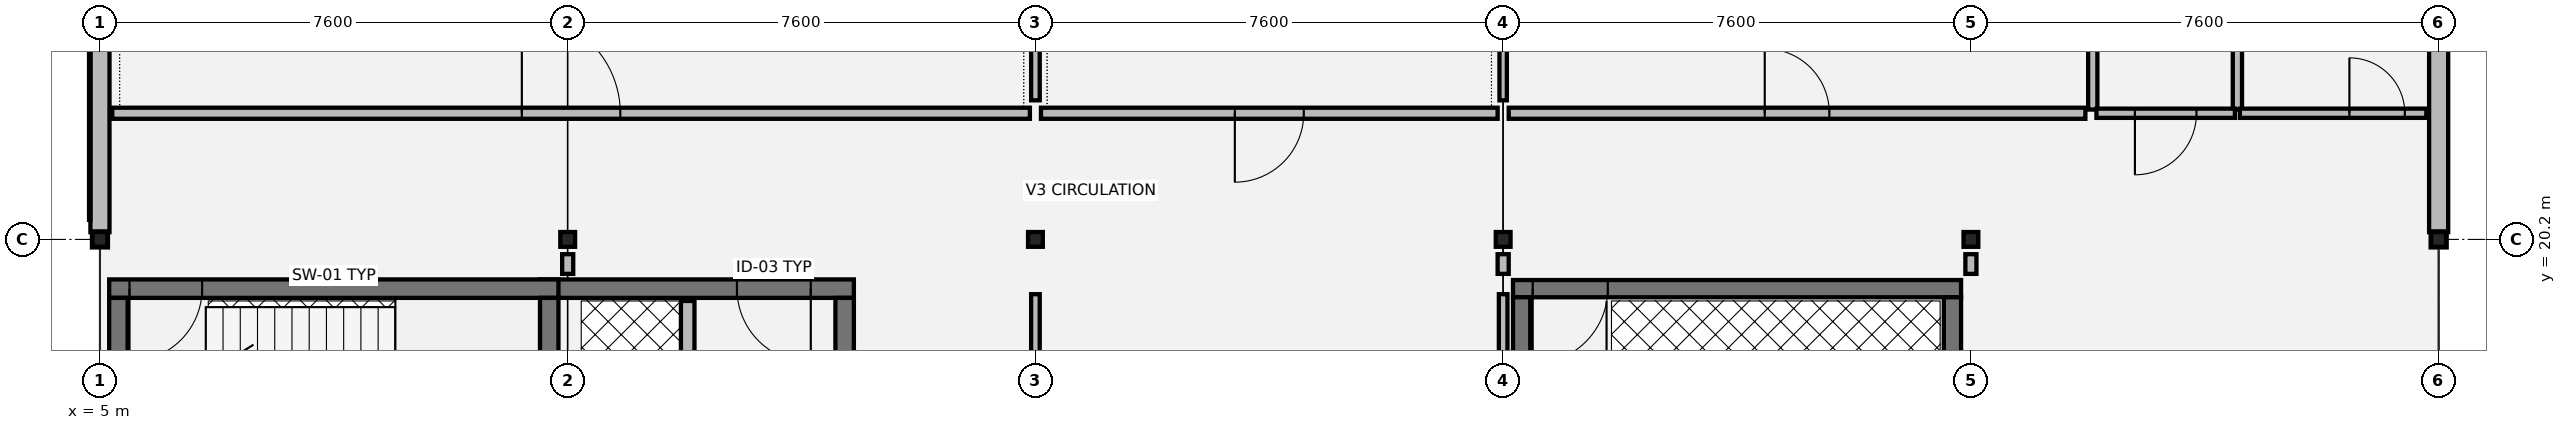
"""IFC4 building model, lengths in metres.
Left out: names, types, materials, properties, quantities, classifications, styles, units other than length and angle.
Written with IfcOpenShell. Run it as: python <this file> out.ifc"""

import sys

from ifc_helpers import new_model, si_unit, direction, frame, frame_2d, origin, origin_2d, place, context, subcontext, project, spatial, rectangle, i_section, extrude, element, fill, save


model = new_model("IFC4")
c1 = context("Model", 3, precision=1e-05, world=origin(), true_north=direction((0.0, 1.0)))
c2 = subcontext(c1, "Body", "Model", "MODEL_VIEW")
j1 = project(units=[si_unit("LENGTHUNIT", "METRE"), si_unit("PLANEANGLEUNIT", "RADIAN")], contexts=[c1])
p1 = place(None, origin())
s1 = spatial("IfcSite", under=j1, at=p1, CompositionType="ELEMENT")
p2 = place(p1, origin())
s2 = spatial("IfcBuilding", under=s1, at=p2, CompositionType="ELEMENT")
p3 = place(p2, frame((0.0, 0.0, 9.18)))
s3 = spatial("IfcBuildingStorey", under=s2, at=p3, CompositionType="ELEMENT", Elevation=9.18)
for number, where, z_axis, x_axis in (
    (1, (5.0, 20.2, 0.0), (0.0, 0.0, 1.0), (1.0, 0.0, 0.0)),
    (2, (12.6, 20.2, 0.0), (0.0, 0.0, 1.0), (1.0, 0.0, 0.0)),
    (3, (20.2, 20.2, 0.0), (0.0, 0.0, 1.0), (1.0, 0.0, 0.0)),
    (4, (27.8, 20.2, 0.0), (0.0, 0.0, 1.0), (1.0, 0.0, 0.0)),
    (5, (35.4, 20.2, 0.0), (0.0, 0.0, 1.0), (1.0, 0.0, 0.0)),
    (6, (43.0, 20.2, 0.0), (0.0, 0.0, 1.0), (1.0, 0.0, 0.0)),
):
    element("IfcColumn", number, at=place(p3, frame(where, z_axis=z_axis, x_axis=x_axis)), inside=s3, PredefinedType="COLUMN", context=c2, shape_type="SweptSolid", body=[
        extrude(i_section(OverallWidth=0.24, OverallDepth=0.24, WebThickness=0.01, FlangeThickness=0.017, at=origin_2d()), origin(), (0.0, 0.0, 1.0), 4.04),
    ])
for number, where, z_axis, x_axis in (
    (7, (43.0, 20.318, 0.0), (0.0, 0.0, 1.0), (0.0, 1.0, 0.0)),
    (8, (5.0, 27.682, 0.0), (0.0, 0.0, 1.0), (0.0, -1.0, 0.0)),
):
    element("IfcWall", number, at=place(p3, frame(where, z_axis=z_axis, x_axis=x_axis)), inside=s3, PredefinedType="SOLIDWALL", context=c2, shape_type="SweptSolid", body=[
        extrude(rectangle(XDim=7.364, YDim=0.31, at=frame_2d((3.682, 0.0))), origin(), (0.0, 0.0, 1.0), 3.48),
    ])
p4 = place(p3, frame((17.25, 19.4, 0.0), z_axis=(0.0, 0.0, 1.0), x_axis=(-1.0, 0.0, 0.0)))
e9 = element("IfcWall", 9, at=p4, inside=s3, PredefinedType="SHEAR", context=c2, shape_type="SweptSolid", body=[
    extrude(rectangle(XDim=5.1, YDim=0.3, at=frame_2d((2.55, 0.0))), origin(), (0.0, 0.0, 1.0), 3.902),
])
p5 = place(p4, frame((0.7, 0.0, 0.0)))
e10 = element("IfcOpeningElement", 10, at=p5, cuts=e9, PredefinedType="OPENING", context=c2, shape_type="SweptSolid", body=[
    extrude(rectangle(XDim=1.2, YDim=2.16, at=frame_2d((0.6, 1.08))), frame((0.0, 0.16, 0.0), z_axis=(0.0, -1.0, 0.0), x_axis=(1.0, 0.0, 0.0)), (0.0, 0.0, 1.0), 0.32),
])
p6 = place(p3, frame((17.1, 13.55, 0.0), z_axis=(0.0, 0.0, 1.0), x_axis=(0.0, 1.0, 0.0)))
e11 = element("IfcWall", 11, at=p6, inside=s3, PredefinedType="SHEAR", context=c2, shape_type="SweptSolid", body=[
    extrude(rectangle(XDim=5.7, YDim=0.3, at=frame_2d((2.85, 0.0))), origin(), (0.0, 0.0, 1.0), 3.902),
])
p7 = place(p3, frame((14.55, 13.6, 0.0), z_axis=(0.0, 0.0, 1.0), x_axis=(0.0, 1.0, 0.0)))
e12 = element("IfcWall", 12, at=p7, inside=s3, PredefinedType="SOLIDWALL", context=c2, shape_type="SweptSolid", body=[
    extrude(rectangle(XDim=5.6, YDim=0.22, at=frame_2d((2.8, 0.0))), origin(), (0.0, 0.0, 1.0), 3.902),
])
p8 = place(p7, frame((0.35, 0.0, 0.0)))
e13 = element("IfcOpeningElement", 13, at=p8, cuts=e12, PredefinedType="OPENING", context=c2, shape_type="SweptSolid", body=[
    extrude(rectangle(XDim=1.1, YDim=2.15, at=frame_2d((0.55, 1.075))), frame((0.0, 0.12, 0.0), z_axis=(0.0, -1.0, 0.0), x_axis=(1.0, 0.0, 0.0)), (0.0, 0.0, 1.0), 0.24),
])
p9 = place(p3, frame((5.15, 19.4, 0.0), z_axis=(0.0, 0.0, 1.0), x_axis=(1.0, 0.0, 0.0)))
e14 = element("IfcWall", 14, at=p9, inside=s3, PredefinedType="SHEAR", context=c2, shape_type="SweptSolid", body=[
    extrude(rectangle(XDim=7.3, YDim=0.3, at=frame_2d((3.65, 0.0))), origin(), (0.0, 0.0, 1.0), 3.902),
])
p10 = place(p9, frame((0.33, 0.0, 0.0)))
e15 = element("IfcOpeningElement", 15, at=p10, cuts=e14, PredefinedType="OPENING", context=c2, shape_type="SweptSolid", body=[
    extrude(rectangle(XDim=1.18, YDim=2.18, at=frame_2d((0.59, 1.09))), frame((0.0, 0.16, 0.0), z_axis=(0.0, -1.0, 0.0), x_axis=(1.0, 0.0, 0.0)), (0.0, 0.0, 1.0), 0.32),
])
for number, where, z_axis, x_axis in (
    (16, (5.3, 13.55, 0.0), (0.0, 0.0, 1.0), (0.0, 1.0, 0.0)),
    (17, (12.3, 13.55, 0.0), (0.0, 0.0, 1.0), (0.0, 1.0, 0.0)),
):
    element("IfcWall", number, at=place(p3, frame(where, z_axis=z_axis, x_axis=x_axis)), inside=s3, PredefinedType="SHEAR", context=c2, shape_type="SweptSolid", body=[
        extrude(rectangle(XDim=5.7, YDim=0.3, at=frame_2d((2.85, 0.0))), origin(), (0.0, 0.0, 1.0), 3.902),
    ])
p11 = place(p3, frame((27.96, 19.4, 0.0), z_axis=(0.0, 0.0, 1.0), x_axis=(1.0, 0.0, 0.0)))
e18 = element("IfcWall", 18, at=p11, inside=s3, PredefinedType="SHEAR", context=c2, shape_type="SweptSolid", body=[
    extrude(rectangle(XDim=7.28, YDim=0.28, at=frame_2d((3.64, 0.0))), origin(), (0.0, 0.0, 1.0), 3.902),
])
p12 = place(p11, frame((0.32, 0.0, 0.0)))
e19 = element("IfcOpeningElement", 19, at=p12, cuts=e18, PredefinedType="OPENING", context=c2, shape_type="SweptSolid", body=[
    extrude(rectangle(XDim=1.22, YDim=2.18, at=frame_2d((0.61, 1.09))), frame((0.0, 0.15, 0.0), z_axis=(0.0, -1.0, 0.0), x_axis=(1.0, 0.0, 0.0)), (0.0, 0.0, 1.0), 0.3),
])
for number, where, z_axis, x_axis in (
    (20, (28.1, 13.54, 0.0), (0.0, 0.0, 1.0), (0.0, 1.0, 0.0)),
    (21, (35.1, 13.54, 0.0), (0.0, 0.0, 1.0), (0.0, 1.0, 0.0)),
):
    element("IfcWall", number, at=place(p3, frame(where, z_axis=z_axis, x_axis=x_axis)), inside=s3, PredefinedType="SHEAR", context=c2, shape_type="SweptSolid", body=[
        extrude(rectangle(XDim=5.72, YDim=0.28, at=frame_2d((2.86, 0.0))), origin(), (0.0, 0.0, 1.0), 3.902),
    ])
for number, where, z_axis, x_axis in (
    (22, (37.38, 22.31, 0.0), (0.0, 0.0, 1.0), (0.0, 1.0, 0.0)),
    (23, (39.73, 22.31, 0.0), (0.0, 0.0, 1.0), (0.0, 1.0, 0.0)),
):
    element("IfcWall", number, at=place(p3, frame(where, z_axis=z_axis, x_axis=x_axis)), inside=s3, PredefinedType="PARTITIONING", context=c2, shape_type="SweptSolid", body=[
        extrude(rectangle(XDim=2.36, YDim=0.15, at=frame_2d((1.18, 0.0))), origin(), (0.0, 0.0, 1.0), 3.18),
    ])
p13 = place(p3, frame((37.44, 22.25, 0.0), z_axis=(0.0, 0.0, 1.0), x_axis=(1.0, 0.0, 0.0)))
e24 = element("IfcWall", 24, at=p13, inside=s3, PredefinedType="PARTITIONING", context=c2, shape_type="SweptSolid", body=[
    extrude(rectangle(XDim=2.25, YDim=0.15, at=frame_2d((1.125, 0.0))), origin(), (0.0, 0.0, 1.0), 3.18),
])
p14 = place(p13, frame((0.625, 0.0, 0.0)))
e25 = element("IfcOpeningElement", 25, at=p14, cuts=e24, PredefinedType="OPENING", context=c2, shape_type="SweptSolid", body=[
    extrude(rectangle(XDim=1.0, YDim=2.15, at=frame_2d((0.5, 1.075))), frame((0.0, 0.085, 0.0), z_axis=(0.0, -1.0, 0.0), x_axis=(1.0, 0.0, 0.0)), (0.0, 0.0, 1.0), 0.17),
])
p15 = place(p3, frame((39.77, 22.25, 0.0), z_axis=(0.0, 0.0, 1.0), x_axis=(1.0, 0.0, 0.0)))
e26 = element("IfcWall", 26, at=p15, inside=s3, PredefinedType="PARTITIONING", context=c2, shape_type="SweptSolid", body=[
    extrude(rectangle(XDim=3.03, YDim=0.15, at=frame_2d((1.515, 0.0))), origin(), (0.0, 0.0, 1.0), 3.18),
])
p16 = place(p15, frame((1.78, 0.0, 0.0)))
e27 = element("IfcOpeningElement", 27, at=p16, cuts=e26, PredefinedType="OPENING", context=c2, shape_type="SweptSolid", body=[
    extrude(rectangle(XDim=0.9, YDim=2.15, at=frame_2d((0.45, 1.075))), frame((0.0, 0.085, 0.0), z_axis=(0.0, -1.0, 0.0), x_axis=(1.0, 0.0, 0.0)), (0.0, 0.0, 1.0), 0.17),
])
p17 = place(p3, frame((5.2, 22.25, 0.0), z_axis=(0.0, 0.0, 1.0), x_axis=(1.0, 0.0, 0.0)))
e28 = element("IfcWall", 28, at=p17, inside=s3, PredefinedType="PARTITIONING", context=c2, shape_type="SweptSolid", body=[
    extrude(rectangle(XDim=14.91, YDim=0.18, at=frame_2d((7.455, 0.0))), origin(), (0.0, 0.0, 1.0), 3.18),
])
p18 = place(p17, frame((6.655, 0.0, 0.0)))
e29 = element("IfcOpeningElement", 29, at=p18, cuts=e28, PredefinedType="OPENING", context=c2, shape_type="SweptSolid", body=[
    extrude(rectangle(XDim=1.6, YDim=2.25, at=frame_2d((0.8, 1.125))), frame((0.0, 0.1, 0.0), z_axis=(0.0, -1.0, 0.0), x_axis=(1.0, 0.0, 0.0)), (0.0, 0.0, 1.0), 0.2),
])
p19 = place(p3, frame((20.29, 22.25, 0.0), z_axis=(0.0, 0.0, 1.0), x_axis=(1.0, 0.0, 0.0)))
e30 = element("IfcWall", 30, at=p19, inside=s3, PredefinedType="PARTITIONING", context=c2, shape_type="SweptSolid", body=[
    extrude(rectangle(XDim=7.42, YDim=0.18, at=frame_2d((3.71, 0.0))), origin(), (0.0, 0.0, 1.0), 3.18),
])
p20 = place(p19, frame((3.15, 0.0, 0.0)))
e31 = element("IfcOpeningElement", 31, at=p20, cuts=e30, PredefinedType="OPENING", context=c2, shape_type="SweptSolid", body=[
    extrude(rectangle(XDim=1.12, YDim=2.15, at=frame_2d((0.56, 1.075))), frame((0.0, 0.1, 0.0), z_axis=(0.0, -1.0, 0.0), x_axis=(1.0, 0.0, 0.0)), (0.0, 0.0, 1.0), 0.2),
])
p21 = place(p3, frame((27.89, 22.25, 0.0), z_axis=(0.0, 0.0, 1.0), x_axis=(1.0, 0.0, 0.0)))
e32 = element("IfcWall", 32, at=p21, inside=s3, PredefinedType="PARTITIONING", context=c2, shape_type="SweptSolid", body=[
    extrude(rectangle(XDim=9.37, YDim=0.18, at=frame_2d((4.685, 0.0))), origin(), (0.0, 0.0, 1.0), 3.18),
])
p22 = place(p21, frame((4.16, 0.0, 0.0)))
e33 = element("IfcOpeningElement", 33, at=p22, cuts=e32, PredefinedType="OPENING", context=c2, shape_type="SweptSolid", body=[
    extrude(rectangle(XDim=1.05, YDim=2.15, at=frame_2d((0.525, 1.075))), frame((0.0, 0.1, 0.0), z_axis=(0.0, -1.0, 0.0), x_axis=(1.0, 0.0, 0.0)), (0.0, 0.0, 1.0), 0.2),
])
for number, where, z_axis, x_axis in (
    (34, (12.6, 19.64, 0.0), (0.0, 0.0, 1.0), (0.0, 1.0, 0.0)),
    (35, (27.8, 19.64, 0.0), (0.0, 0.0, 1.0), (0.0, 1.0, 0.0)),
    (36, (35.4, 19.64, 0.0), (0.0, 0.0, 1.0), (0.0, 1.0, 0.0)),
):
    element("IfcWall", number, at=place(p3, frame(where, z_axis=z_axis, x_axis=x_axis)), inside=s3, PredefinedType="PARTITIONING", context=c2, shape_type="SweptSolid", body=[
        extrude(rectangle(XDim=0.32, YDim=0.18, at=frame_2d((0.16, 0.0))), origin(), (0.0, 0.0, 1.0), 3.18),
    ])
p23 = place(p3, frame((20.2, 22.46, 0.0), z_axis=(0.0, 0.0, 1.0), x_axis=(0.0, 1.0, 0.0)))
e37 = element("IfcWall", 37, at=p23, inside=s3, PredefinedType="PARTITIONING", context=c2, shape_type="SweptSolid", body=[
    extrude(rectangle(XDim=12.62, YDim=0.14, at=frame_2d((6.31, 0.0))), origin(), (0.0, 0.0, 1.0), 3.18),
])
p24 = place(p3, frame((20.2, 5.32, 0.0), z_axis=(0.0, 0.0, 1.0), x_axis=(0.0, 1.0, 0.0)))
e38 = element("IfcWall", 38, at=p24, inside=s3, PredefinedType="PARTITIONING", context=c2, shape_type="SweptSolid", body=[
    extrude(rectangle(XDim=13.99, YDim=0.14, at=frame_2d((6.995, 0.0))), origin(), (0.0, 0.0, 1.0), 3.18),
])
p25 = place(p24, frame((4.945, 0.0, 0.0)))
e39 = element("IfcOpeningElement", 39, at=p25, cuts=e38, PredefinedType="OPENING", context=c2, shape_type="SweptSolid", body=[
    extrude(rectangle(XDim=1.4, YDim=2.22, at=frame_2d((0.7, 1.11))), frame((0.0, 0.08, 0.0), z_axis=(0.0, -1.0, 0.0), x_axis=(1.0, 0.0, 0.0)), (0.0, 0.0, 1.0), 0.16),
])
p26 = place(p3, frame((27.8, 22.46, 0.0), z_axis=(0.0, 0.0, 1.0), x_axis=(0.0, 1.0, 0.0)))
e40 = element("IfcWall", 40, at=p26, inside=s3, PredefinedType="PARTITIONING", context=c2, shape_type="SweptSolid", body=[
    extrude(rectangle(XDim=12.62, YDim=0.12, at=frame_2d((6.31, 0.0))), origin(), (0.0, 0.0, 1.0), 3.18),
])
p27 = place(p3, frame((27.8, 5.32, 0.0), z_axis=(0.0, 0.0, 1.0), x_axis=(0.0, 1.0, 0.0)))
e41 = element("IfcWall", 41, at=p27, inside=s3, PredefinedType="PARTITIONING", context=c2, shape_type="SweptSolid", body=[
    extrude(rectangle(XDim=13.99, YDim=0.14, at=frame_2d((6.995, 0.0))), origin(), (0.0, 0.0, 1.0), 2.445),
])
p28 = place(p27, frame((5.015, 0.0, 0.0)))
e42 = element("IfcOpeningElement", 42, at=p28, cuts=e41, PredefinedType="OPENING", context=c2, shape_type="SweptSolid", body=[
    extrude(rectangle(XDim=1.26, YDim=2.2, at=frame_2d((0.63, 1.1))), frame((0.0, 0.08, 0.0), z_axis=(0.0, -1.0, 0.0), x_axis=(1.0, 0.0, 0.0)), (0.0, 0.0, 1.0), 0.16),
])
p29 = place(p5, origin())
e43 = element("IfcDoor", 43, at=p29, inside=s3, OperationType="SINGLE_SWING_LEFT", PredefinedType="DOOR", context=c2, shape_type="SweptSolid", body=[
    extrude(rectangle(XDim=1.2, YDim=2.16, at=frame_2d((0.6, 1.08))), frame((0.0, 0.025, 0.0), z_axis=(0.0, -1.0, 0.0), x_axis=(1.0, 0.0, 0.0)), (0.0, 0.0, 1.0), 0.05),
])
fill(e10, e43)
p30 = place(p10, origin())
e44 = element("IfcDoor", 44, at=p30, inside=s3, OperationType="SINGLE_SWING_RIGHT", PredefinedType="DOOR", context=c2, shape_type="SweptSolid", body=[
    extrude(rectangle(XDim=1.18, YDim=2.18, at=frame_2d((0.59, 1.09))), frame((0.0, 0.025, 0.0), z_axis=(0.0, -1.0, 0.0), x_axis=(1.0, 0.0, 0.0)), (0.0, 0.0, 1.0), 0.05),
])
fill(e15, e44)
p31 = place(p12, origin())
e45 = element("IfcDoor", 45, at=p31, inside=s3, OperationType="SINGLE_SWING_RIGHT", PredefinedType="DOOR", context=c2, shape_type="SweptSolid", body=[
    extrude(rectangle(XDim=1.22, YDim=2.18, at=frame_2d((0.61, 1.09))), frame((0.0, 0.025, 0.0), z_axis=(0.0, -1.0, 0.0), x_axis=(1.0, 0.0, 0.0)), (0.0, 0.0, 1.0), 0.05),
])
fill(e19, e45)
p32 = place(p14, origin())
e46 = element("IfcDoor", 46, at=p32, inside=s3, OperationType="SINGLE_SWING_RIGHT", PredefinedType="DOOR", context=c2, shape_type="SweptSolid", body=[
    extrude(rectangle(XDim=1.0, YDim=2.15, at=frame_2d((0.5, 1.075))), frame((0.0, 0.025, 0.0), z_axis=(0.0, -1.0, 0.0), x_axis=(1.0, 0.0, 0.0)), (0.0, 0.0, 1.0), 0.05),
])
fill(e25, e46)
p33 = place(p16, origin())
e47 = element("IfcDoor", 47, at=p33, inside=s3, OperationType="SINGLE_SWING_LEFT", PredefinedType="DOOR", context=c2, shape_type="SweptSolid", body=[
    extrude(rectangle(XDim=0.9, YDim=2.15, at=frame_2d((0.45, 1.075))), frame((0.0, 0.025, 0.0), z_axis=(0.0, -1.0, 0.0), x_axis=(1.0, 0.0, 0.0)), (0.0, 0.0, 1.0), 0.05),
])
fill(e27, e47)
p34 = place(p18, origin())
e48 = element("IfcDoor", 48, at=p34, inside=s3, OperationType="DOUBLE_DOOR_SINGLE_SWING", PredefinedType="DOOR", context=c2, shape_type="SweptSolid", body=[
    extrude(rectangle(XDim=1.6, YDim=2.25, at=frame_2d((0.8, 1.125))), frame((0.0, 0.025, 0.0), z_axis=(0.0, -1.0, 0.0), x_axis=(1.0, 0.0, 0.0)), (0.0, 0.0, 1.0), 0.05),
])
fill(e29, e48)
p35 = place(p20, origin())
e49 = element("IfcDoor", 49, at=p35, inside=s3, OperationType="SINGLE_SWING_RIGHT", PredefinedType="DOOR", context=c2, shape_type="SweptSolid", body=[
    extrude(rectangle(XDim=1.12, YDim=2.15, at=frame_2d((0.56, 1.075))), frame((0.0, 0.025, 0.0), z_axis=(0.0, -1.0, 0.0), x_axis=(1.0, 0.0, 0.0)), (0.0, 0.0, 1.0), 0.05),
])
fill(e31, e49)
p36 = place(p22, origin())
e50 = element("IfcDoor", 50, at=p36, inside=s3, OperationType="SINGLE_SWING_LEFT", PredefinedType="DOOR", context=c2, shape_type="SweptSolid", body=[
    extrude(rectangle(XDim=1.05, YDim=2.15, at=frame_2d((0.525, 1.075))), frame((0.0, 0.025, 0.0), z_axis=(0.0, -1.0, 0.0), x_axis=(1.0, 0.0, 0.0)), (0.0, 0.0, 1.0), 0.05),
])
fill(e33, e50)
save(model, sys.argv[1])
